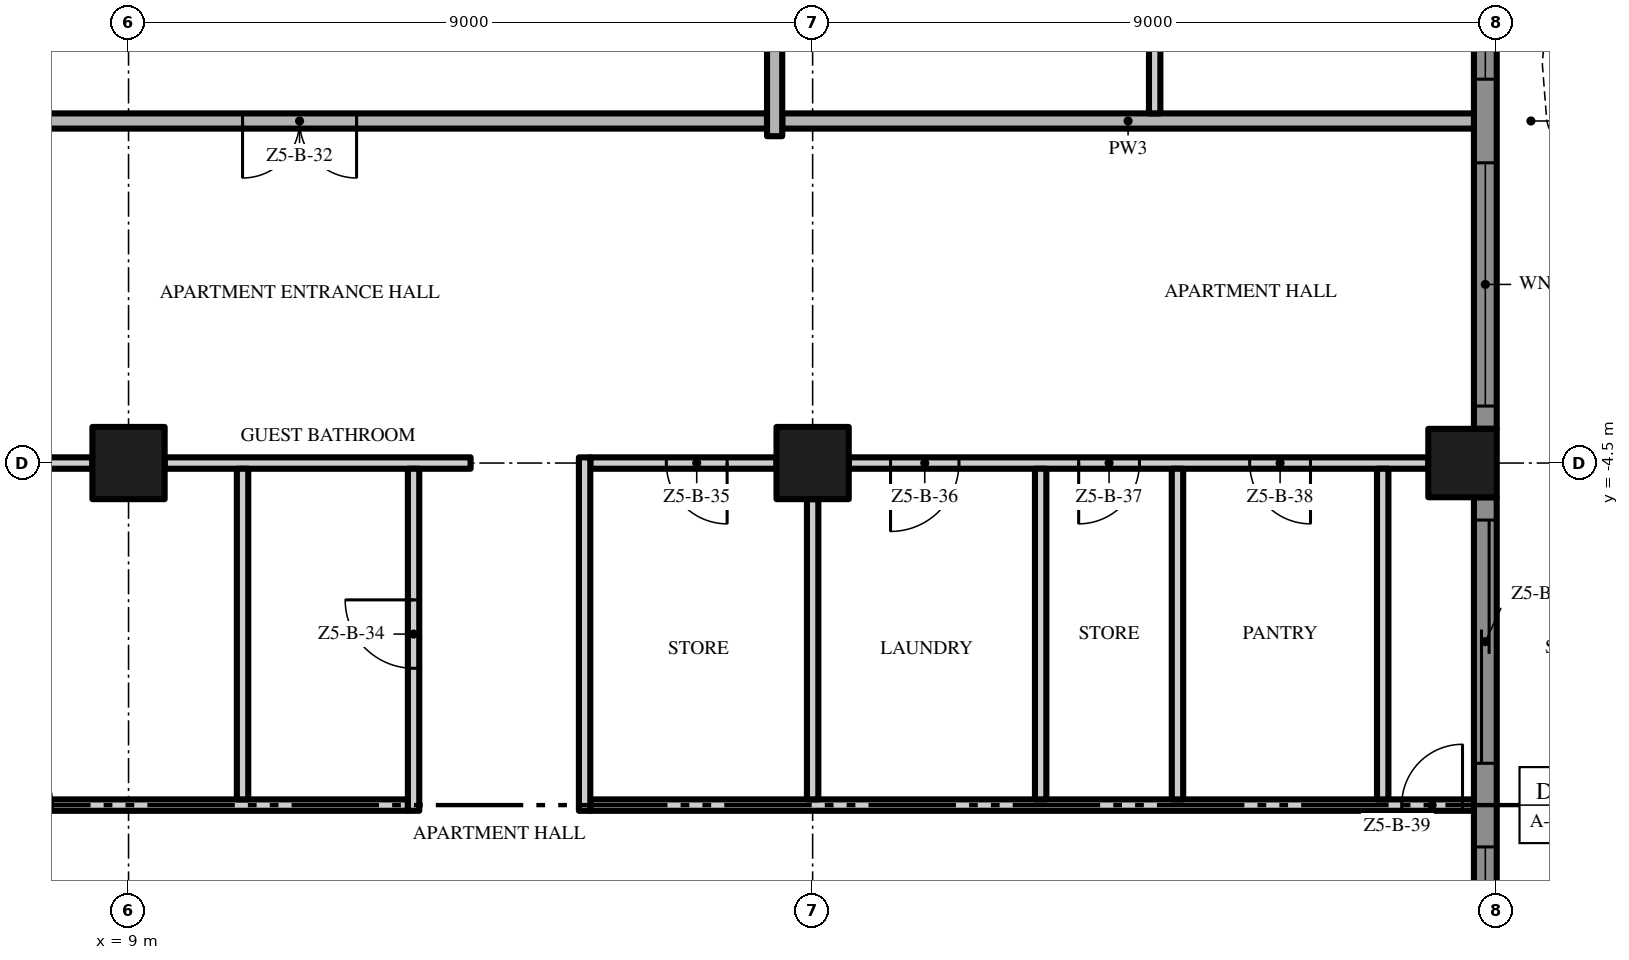
"""IFC4 building model, lengths in metres.
Left out: names, types, materials, properties, quantities, classifications, styles, units other than length and angle.
Written with IfcOpenShell. Run it as: python <this file> out.ifc"""

import sys

from ifc_helpers import new_model, si_unit, direction, frame, frame_2d, origin, origin_2d, place, context, subcontext, project, spatial, polyline, rectangle, outline, extrude, element, fill, save


model = new_model("IFC4")
c1 = context("Model", 3, precision=1e-05, world=origin(), true_north=direction((0.0, 1.0)))
c2 = subcontext(c1, "Body", "Model", "MODEL_VIEW")
j1 = project(units=[si_unit("LENGTHUNIT", "METRE"), si_unit("PLANEANGLEUNIT", "RADIAN")], contexts=[c1])
p1 = place(None, origin())
s1 = spatial("IfcSite", under=j1, at=p1, CompositionType="ELEMENT")
p2 = place(p1, origin())
s2 = spatial("IfcBuilding", under=s1, at=p2, CompositionType="ELEMENT")
p3 = place(p2, frame((0.0, 0.0, 257.8)))
s3 = spatial("IfcBuildingStorey", under=s2, at=p3, CompositionType="ELEMENT", Elevation=257.8)
p4 = place(p3, frame((18.0, -4.5, 0.0), z_axis=(0.0, 0.0, 1.0), x_axis=(1.0, 0.0, 0.0)))
e1 = element("IfcColumn", 1, at=p4, inside=s3, PredefinedType="COLUMN", context=c2, shape_type="SweptSolid", body=[
    extrude(rectangle(XDim=0.95, YDim=0.95, at=origin_2d()), origin(), (0.0, 0.0, 1.0), 3.5),
])
p5 = place(p3, frame((26.55, -4.5, 0.0), z_axis=(0.0, 0.0, 1.0), x_axis=(1.0, 0.0, 0.0)))
e2 = element("IfcColumn", 2, at=p5, inside=s3, PredefinedType="COLUMN", context=c2, shape_type="SweptSolid", body=[
    extrude(rectangle(XDim=0.9, YDim=0.9, at=origin_2d()), origin(), (0.0, 0.0, 1.0), 3.5),
])
p6 = place(p3, frame((9.0, -4.5, 0.0), z_axis=(0.0, 0.0, 1.0), x_axis=(1.0, 0.0, 0.0)))
e3 = element("IfcColumn", 3, at=p6, inside=s3, PredefinedType="COLUMN", context=c2, shape_type="SweptSolid", body=[
    extrude(rectangle(XDim=0.95, YDim=0.95, at=origin_2d()), origin(), (0.0, 0.0, 1.0), 3.5),
])
p7 = place(p3, frame((26.85, -4.95, 0.0), z_axis=(0.0, 0.0, 1.0), x_axis=(0.0, -1.0, 0.0)))
e4 = element("IfcWall", 4, at=p7, inside=s3, PredefinedType="SOLIDWALL", context=c2, shape_type="SweptSolid", body=[
    extrude(rectangle(XDim=8.1, YDim=0.3, at=frame_2d((4.05, 0.0))), origin(), (0.0, 0.0, 1.0), 3.5),
])
p8 = place(p7, frame((4.6, 0.0, 0.45)))
e5 = element("IfcOpeningElement", 5, at=p8, cuts=e4, PredefinedType="OPENING", context=c2, shape_type="SweptSolid", body=[
    extrude(rectangle(XDim=3.2, YDim=2.65, at=frame_2d((1.6, 1.325))), frame((0.0, 0.16, 0.0), z_axis=(0.0, -1.0, 0.0), x_axis=(1.0, 0.0, 0.0)), (0.0, 0.0, 1.0), 0.32),
])
p9 = place(p7, frame((0.3, 0.0, 0.0)))
e6 = element("IfcOpeningElement", 6, at=p9, cuts=e4, PredefinedType="OPENING", context=c2, shape_type="SweptSolid", body=[
    extrude(rectangle(XDim=3.2, YDim=2.4, at=frame_2d((1.6, 1.2))), frame((0.0, 0.16, 0.0), z_axis=(0.0, -1.0, 0.0), x_axis=(1.0, 0.0, 0.0)), (0.0, 0.0, 1.0), 0.32),
])
p10 = place(p3, frame((26.85, 4.05, 0.0), z_axis=(0.0, 0.0, 1.0), x_axis=(0.0, -1.0, 0.0)))
e7 = element("IfcWall", 7, at=p10, inside=s3, PredefinedType="SOLIDWALL", context=c2, shape_type="SweptSolid", body=[
    extrude(rectangle(XDim=8.1, YDim=0.3, at=frame_2d((4.05, 0.0))), origin(), (0.0, 0.0, 1.0), 3.5),
])
p11 = place(p10, frame((4.6, 0.0, 0.45)))
e8 = element("IfcOpeningElement", 8, at=p11, cuts=e7, PredefinedType="OPENING", context=c2, shape_type="SweptSolid", body=[
    extrude(rectangle(XDim=3.2, YDim=2.65, at=frame_2d((1.6, 1.325))), frame((0.0, 0.16, 0.0), z_axis=(0.0, -1.0, 0.0), x_axis=(1.0, 0.0, 0.0)), (0.0, 0.0, 1.0), 0.32),
])
p12 = place(p10, frame((0.3, 0.0, 0.45)))
e9 = element("IfcOpeningElement", 9, at=p12, cuts=e7, PredefinedType="OPENING", context=c2, shape_type="SweptSolid", body=[
    extrude(rectangle(XDim=3.2, YDim=2.65, at=frame_2d((1.6, 1.325))), frame((0.0, 0.16, 0.0), z_axis=(0.0, -1.0, 0.0), x_axis=(1.0, 0.0, 0.0)), (0.0, 0.0, 1.0), 0.32),
])
p13 = place(p3, origin())
e10 = element("IfcWall", 10, at=p13, inside=s3, PredefinedType="USERDEFINED", context=c2, shape_type="SweptSolid", body=[
    extrude(outline(polyline([(28.8, -18.0), (28.095, -16.5), (27.659, -15.0), (27.6, -14.25), (27.659, -13.5), (28.095, -12.0), (28.8, -10.5), (29.505, -9.0), (29.941, -7.5), (30.0, -6.75), (29.941, -6.0), (29.505, -4.5), (28.8, -3.0), (28.095, -1.5), (27.659, 0.0), (27.6, 0.75), (27.659, 1.5), (28.095, 3.0), (28.8, 4.5), (29.505, 6.0), (29.941, 7.5), (30.0, 8.25), (29.941, 9.0), (29.505, 10.5), (28.8, 12.0), (28.095, 13.5), (27.659, 15.0), (27.6, 15.75), (27.659, 16.5), (28.095, 18.0), (27.855, 18.07), (27.411, 16.545), (27.349, 15.75), (27.411, 14.955), (27.86, 13.411), (28.574, 11.894), (29.271, 10.411), (29.694, 8.955), (29.749, 8.25), (29.694, 7.545), (29.271, 6.089), (28.574, 4.606), (27.86, 3.089), (27.411, 1.545), (27.349, 0.75), (27.411, -0.045), (27.86, -1.589), (28.574, -3.106), (29.271, -4.589), (29.694, -6.045), (29.749, -6.75), (29.694, -7.455), (29.271, -8.911), (28.574, -10.394), (27.86, -11.911), (27.411, -13.455), (27.349, -14.25), (27.411, -15.045), (27.86, -16.589), (28.574, -18.106), (28.8, -18.0)])), origin(), (0.0, 0.0, 1.0), 0.9),
])
p14 = place(p3, frame((4.6, -9.0, 0.0), z_axis=(0.0, 0.0, 1.0), x_axis=(1.0, 0.0, 0.0)))
e11 = element("IfcWall", 11, at=p14, inside=s3, PredefinedType="PARTITIONING", context=c2, shape_type="SweptSolid", body=[
    extrude(rectangle(XDim=8.075, YDim=0.15, at=frame_2d((4.037, 0.0))), origin(), (0.0, 0.0, 1.0), 3.5),
])
p15 = place(p14, frame((2.4, 0.0, 0.0)))
e12 = element("IfcOpeningElement", 12, at=p15, cuts=e11, PredefinedType="OPENING", context=c2, shape_type="SweptSolid", body=[
    extrude(rectangle(XDim=1.0, YDim=2.4, at=frame_2d((0.5, 1.2))), frame((0.0, 0.085, 0.0), z_axis=(0.0, -1.0, 0.0), x_axis=(1.0, 0.0, 0.0)), (0.0, 0.0, 1.0), 0.17),
])
p16 = place(p3, frame((15.075, -9.0, 0.0), z_axis=(0.0, 0.0, 1.0), x_axis=(1.0, 0.0, 0.0)))
e13 = element("IfcWall", 13, at=p16, inside=s3, PredefinedType="PARTITIONING", context=c2, shape_type="SweptSolid", body=[
    extrude(rectangle(XDim=11.625, YDim=0.15, at=frame_2d((5.812, 0.0))), origin(), (0.0, 0.0, 1.0), 3.5),
])
p17 = place(p16, frame((10.675, 0.0, 0.0)))
e14 = element("IfcOpeningElement", 14, at=p17, cuts=e13, PredefinedType="OPENING", context=c2, shape_type="SweptSolid", body=[
    extrude(rectangle(XDim=0.8, YDim=2.0, at=frame_2d((0.4, 1.0))), frame((0.0, 0.085, 0.0), z_axis=(0.0, -1.0, 0.0), x_axis=(1.0, 0.0, 0.0)), (0.0, 0.0, 1.0), 0.17),
])
p18 = place(p3, frame((4.6, -4.5, 0.0), z_axis=(0.0, 0.0, 1.0), x_axis=(1.0, 0.0, 0.0)))
e15 = element("IfcWall", 15, at=p18, inside=s3, PredefinedType="PARTITIONING", context=c2, shape_type="SweptSolid", body=[
    extrude(rectangle(XDim=3.925, YDim=0.15, at=frame_2d((1.962, 0.0))), origin(), (0.0, 0.0, 1.0), 3.5),
])
p19 = place(p3, frame((9.475, -4.5, 0.0), z_axis=(0.0, 0.0, 1.0), x_axis=(1.0, 0.0, 0.0)))
e16 = element("IfcWall", 16, at=p19, inside=s3, PredefinedType="PARTITIONING", context=c2, shape_type="SweptSolid", body=[
    extrude(rectangle(XDim=4.025, YDim=0.15, at=frame_2d((2.013, 0.0))), origin(), (0.0, 0.0, 1.0), 3.5),
])
p20 = place(p3, frame((17.525, -4.5, 0.0), z_axis=(0.0, 0.0, 1.0), x_axis=(-1.0, 0.0, 0.0)))
e17 = element("IfcWall", 17, at=p20, inside=s3, PredefinedType="PARTITIONING", context=c2, shape_type="SweptSolid", body=[
    extrude(rectangle(XDim=2.45, YDim=0.15, at=frame_2d((1.225, 0.0))), origin(), (0.0, 0.0, 1.0), 3.5),
])
p21 = place(p20, frame((0.65, 0.0, 0.0)))
e18 = element("IfcOpeningElement", 18, at=p21, cuts=e17, PredefinedType="OPENING", context=c2, shape_type="SweptSolid", body=[
    extrude(rectangle(XDim=0.8, YDim=2.0, at=frame_2d((0.4, 1.0))), frame((0.0, 0.085, 0.0), z_axis=(0.0, -1.0, 0.0), x_axis=(1.0, 0.0, 0.0)), (0.0, 0.0, 1.0), 0.17),
])
p22 = place(p3, frame((26.1, -4.5, 0.0), z_axis=(0.0, 0.0, 1.0), x_axis=(-1.0, 0.0, 0.0)))
e19 = element("IfcWall", 19, at=p22, inside=s3, PredefinedType="PARTITIONING", context=c2, shape_type="SweptSolid", body=[
    extrude(rectangle(XDim=7.625, YDim=0.15, at=frame_2d((3.812, 0.0))), origin(), (0.0, 0.0, 1.0), 3.5),
])
p23 = place(p22, frame((6.175, 0.0, 0.0)))
e20 = element("IfcOpeningElement", 20, at=p23, cuts=e19, PredefinedType="OPENING", context=c2, shape_type="SweptSolid", body=[
    extrude(rectangle(XDim=0.9, YDim=2.1, at=frame_2d((0.45, 1.05))), frame((0.0, 0.085, 0.0), z_axis=(0.0, -1.0, 0.0), x_axis=(1.0, 0.0, 0.0)), (0.0, 0.0, 1.0), 0.17),
])
p24 = place(p22, frame((3.8, 0.0, 0.0)))
e21 = element("IfcOpeningElement", 21, at=p24, cuts=e19, PredefinedType="OPENING", context=c2, shape_type="SweptSolid", body=[
    extrude(rectangle(XDim=0.8, YDim=2.0, at=frame_2d((0.4, 1.0))), frame((0.0, 0.085, 0.0), z_axis=(0.0, -1.0, 0.0), x_axis=(1.0, 0.0, 0.0)), (0.0, 0.0, 1.0), 0.17),
])
p25 = place(p22, frame((1.55, 0.0, 0.0)))
e22 = element("IfcOpeningElement", 22, at=p25, cuts=e19, PredefinedType="OPENING", context=c2, shape_type="SweptSolid", body=[
    extrude(rectangle(XDim=0.8, YDim=2.0, at=frame_2d((0.4, 1.0))), frame((0.0, 0.085, 0.0), z_axis=(0.0, -1.0, 0.0), x_axis=(1.0, 0.0, 0.0)), (0.0, 0.0, 1.0), 0.17),
])
p26 = place(p3, frame((17.4, 0.0, 0.0), z_axis=(0.0, 0.0, 1.0), x_axis=(-1.0, 0.0, 0.0)))
e23 = element("IfcWall", 23, at=p26, inside=s3, PredefinedType="PARTITIONING", context=c2, shape_type="SweptSolid", body=[
    extrude(rectangle(XDim=34.8, YDim=0.2, at=frame_2d((17.4, 0.0))), origin(), (0.0, 0.0, 1.0), 3.5),
])
p27 = place(p26, frame((23.4, 0.0, 0.0)))
e24 = element("IfcOpeningElement", 24, at=p27, cuts=e23, PredefinedType="OPENING", context=c2, shape_type="SweptSolid", body=[
    extrude(rectangle(XDim=1.5, YDim=2.4, at=frame_2d((0.75, 1.2))), frame((0.0, 0.11, 0.0), z_axis=(0.0, -1.0, 0.0), x_axis=(1.0, 0.0, 0.0)), (0.0, 0.0, 1.0), 0.22),
])
p28 = place(p26, frame((5.4, 0.0, 0.0)))
e25 = element("IfcOpeningElement", 25, at=p28, cuts=e23, PredefinedType="OPENING", context=c2, shape_type="SweptSolid", body=[
    extrude(rectangle(XDim=1.5, YDim=2.4, at=frame_2d((0.75, 1.2))), frame((0.0, 0.11, 0.0), z_axis=(0.0, -1.0, 0.0), x_axis=(1.0, 0.0, 0.0)), (0.0, 0.0, 1.0), 0.22),
])
p29 = place(p3, frame((17.6, 0.0, 0.0), z_axis=(0.0, 0.0, 1.0), x_axis=(1.0, 0.0, 0.0)))
e26 = element("IfcWall", 26, at=p29, inside=s3, PredefinedType="PARTITIONING", context=c2, shape_type="SweptSolid", body=[
    extrude(rectangle(XDim=9.1, YDim=0.2, at=frame_2d((4.55, 0.0))), origin(), (0.0, 0.0, 1.0), 3.5),
])
p30 = place(p3, frame((10.5, -8.925, 0.0), z_axis=(0.0, 0.0, 1.0), x_axis=(0.0, 1.0, 0.0)))
e27 = element("IfcWall", 27, at=p30, inside=s3, PredefinedType="PARTITIONING", context=c2, shape_type="SweptSolid", body=[
    extrude(rectangle(XDim=4.35, YDim=0.15, at=frame_2d((2.175, 0.0))), origin(), (0.0, 0.0, 1.0), 3.5),
])
p31 = place(p3, frame((12.75, -9.075, 0.0), z_axis=(0.0, 0.0, 1.0), x_axis=(0.0, 1.0, 0.0)))
e28 = element("IfcWall", 28, at=p31, inside=s3, PredefinedType="PARTITIONING", context=c2, shape_type="SweptSolid", body=[
    extrude(rectangle(XDim=4.5, YDim=0.15, at=frame_2d((2.25, 0.0))), origin(), (0.0, 0.0, 1.0), 3.5),
])
p32 = place(p31, frame((1.875, 0.0, 0.0)))
e29 = element("IfcOpeningElement", 29, at=p32, cuts=e28, PredefinedType="OPENING", context=c2, shape_type="SweptSolid", body=[
    extrude(rectangle(XDim=0.9, YDim=2.1, at=frame_2d((0.45, 1.05))), frame((0.0, 0.085, 0.0), z_axis=(0.0, -1.0, 0.0), x_axis=(1.0, 0.0, 0.0)), (0.0, 0.0, 1.0), 0.17),
])
p33 = place(p3, frame((15.0, -9.075, 0.0), z_axis=(0.0, 0.0, 1.0), x_axis=(0.0, 1.0, 0.0)))
e30 = element("IfcWall", 30, at=p33, inside=s3, PredefinedType="PARTITIONING", context=c2, shape_type="SweptSolid", body=[
    extrude(rectangle(XDim=4.65, YDim=0.15, at=frame_2d((2.325, 0.0))), origin(), (0.0, 0.0, 1.0), 3.5),
])
p34 = place(p3, frame((17.5, -0.2, 0.0), z_axis=(0.0, 0.0, 1.0), x_axis=(0.0, 1.0, 0.0)))
e31 = element("IfcWall", 31, at=p34, inside=s3, PredefinedType="PARTITIONING", context=c2, shape_type="SweptSolid", body=[
    extrude(rectangle(XDim=4.225, YDim=0.2, at=frame_2d((2.112, 0.0))), origin(), (0.0, 0.0, 1.0), 3.5),
])
p35 = place(p3, frame((18.0, -8.925, 0.0), z_axis=(0.0, 0.0, 1.0), x_axis=(0.0, 1.0, 0.0)))
e32 = element("IfcWall", 32, at=p35, inside=s3, PredefinedType="PARTITIONING", context=c2, shape_type="SweptSolid", body=[
    extrude(rectangle(XDim=3.95, YDim=0.15, at=frame_2d((1.975, 0.0))), origin(), (0.0, 0.0, 1.0), 3.5),
])
p36 = place(p3, frame((21.0, -8.925, 0.0), z_axis=(0.0, 0.0, 1.0), x_axis=(0.0, 1.0, 0.0)))
e33 = element("IfcWall", 33, at=p36, inside=s3, PredefinedType="PARTITIONING", context=c2, shape_type="SweptSolid", body=[
    extrude(rectangle(XDim=4.35, YDim=0.15, at=frame_2d((2.175, 0.0))), origin(), (0.0, 0.0, 1.0), 3.5),
])
p37 = place(p3, frame((22.5, 17.55, 0.0), z_axis=(0.0, 0.0, 1.0), x_axis=(0.0, -1.0, 0.0)))
e34 = element("IfcWall", 34, at=p37, inside=s3, PredefinedType="PARTITIONING", context=c2, shape_type="SweptSolid", body=[
    extrude(rectangle(XDim=17.45, YDim=0.15, at=frame_2d((8.725, 0.0))), origin(), (0.0, 0.0, 1.0), 3.5),
])
p38 = place(p37, frame((14.8, 0.0, 0.0)))
e35 = element("IfcOpeningElement", 35, at=p38, cuts=e34, PredefinedType="OPENING", context=c2, shape_type="SweptSolid", body=[
    extrude(rectangle(XDim=1.0, YDim=2.4, at=frame_2d((0.5, 1.2))), frame((0.0, 0.085, 0.0), z_axis=(0.0, -1.0, 0.0), x_axis=(1.0, 0.0, 0.0)), (0.0, 0.0, 1.0), 0.17),
])
p39 = place(p37, frame((7.65, 0.0, 0.0)))
e36 = element("IfcOpeningElement", 36, at=p39, cuts=e34, PredefinedType="OPENING", context=c2, shape_type="SweptSolid", body=[
    extrude(rectangle(XDim=1.8, YDim=2.4, at=frame_2d((0.9, 1.2))), frame((0.0, 0.085, 0.0), z_axis=(0.0, -1.0, 0.0), x_axis=(1.0, 0.0, 0.0)), (0.0, 0.0, 1.0), 0.17),
])
for number, where, z_axis, x_axis in (
    (37, (22.8, -8.925, 0.0), (0.0, 0.0, 1.0), (0.0, 1.0, 0.0)),
    (38, (25.5, -8.925, 0.0), (0.0, 0.0, 1.0), (0.0, 1.0, 0.0)),
):
    element("IfcWall", number, at=place(p3, frame(where, z_axis=z_axis, x_axis=x_axis)), inside=s3, PredefinedType="PARTITIONING", context=c2, shape_type="SweptSolid", body=[
        extrude(rectangle(XDim=4.35, YDim=0.15, at=frame_2d((2.175, 0.0))), origin(), (0.0, 0.0, 1.0), 3.5),
    ])
p40 = place(p8, origin())
e39 = element("IfcWindow", 39, at=p40, inside=s3, PartitioningType="SINGLE_PANEL", PredefinedType="WINDOW", context=c2, shape_type="SweptSolid", body=[
    extrude(rectangle(XDim=3.2, YDim=2.65, at=frame_2d((1.6, 1.325))), frame((0.0, 0.03, 0.0), z_axis=(0.0, -1.0, 0.0), x_axis=(1.0, 0.0, 0.0)), (0.0, 0.0, 1.0), 0.06),
])
fill(e5, e39)
p41 = place(p9, origin())
e40 = element("IfcDoor", 40, at=p41, inside=s3, OperationType="SINGLE_SWING_LEFT", PredefinedType="DOOR", context=c2, shape_type="SweptSolid", body=[
    extrude(rectangle(XDim=3.2, YDim=2.4, at=frame_2d((1.6, 1.2))), frame((0.0, 0.025, 0.0), z_axis=(0.0, -1.0, 0.0), x_axis=(1.0, 0.0, 0.0)), (0.0, 0.0, 1.0), 0.05),
])
fill(e6, e40)
p42 = place(p11, origin())
e41 = element("IfcWindow", 41, at=p42, inside=s3, PartitioningType="SINGLE_PANEL", PredefinedType="WINDOW", context=c2, shape_type="SweptSolid", body=[
    extrude(rectangle(XDim=3.2, YDim=2.65, at=frame_2d((1.6, 1.325))), frame((0.0, 0.03, 0.0), z_axis=(0.0, -1.0, 0.0), x_axis=(1.0, 0.0, 0.0)), (0.0, 0.0, 1.0), 0.06),
])
fill(e8, e41)
p43 = place(p12, origin())
e42 = element("IfcWindow", 42, at=p43, inside=s3, PartitioningType="SINGLE_PANEL", PredefinedType="WINDOW", context=c2, shape_type="SweptSolid", body=[
    extrude(rectangle(XDim=3.2, YDim=2.65, at=frame_2d((1.6, 1.325))), frame((0.0, 0.03, 0.0), z_axis=(0.0, -1.0, 0.0), x_axis=(1.0, 0.0, 0.0)), (0.0, 0.0, 1.0), 0.06),
])
fill(e9, e42)
p44 = place(p28, origin())
e43 = element("IfcDoor", 43, at=p44, inside=s3, OperationType="DOUBLE_DOOR_SINGLE_SWING", PredefinedType="DOOR", context=c2, shape_type="SweptSolid", body=[
    extrude(rectangle(XDim=1.5, YDim=2.4, at=frame_2d((0.75, 1.2))), frame((0.0, 0.025, 0.0), z_axis=(0.0, -1.0, 0.0), x_axis=(1.0, 0.0, 0.0)), (0.0, 0.0, 1.0), 0.05),
])
fill(e25, e43)
p45 = place(p32, origin())
e44 = element("IfcDoor", 44, at=p45, inside=s3, OperationType="SINGLE_SWING_RIGHT", PredefinedType="DOOR", context=c2, shape_type="SweptSolid", body=[
    extrude(rectangle(XDim=0.9, YDim=2.1, at=frame_2d((0.45, 1.05))), frame((0.0, 0.025, 0.0), z_axis=(0.0, -1.0, 0.0), x_axis=(1.0, 0.0, 0.0)), (0.0, 0.0, 1.0), 0.05),
])
fill(e29, e44)
p46 = place(p21, origin())
e45 = element("IfcDoor", 45, at=p46, inside=s3, OperationType="SINGLE_SWING_LEFT", PredefinedType="DOOR", context=c2, shape_type="SweptSolid", body=[
    extrude(rectangle(XDim=0.8, YDim=2.0, at=frame_2d((0.4, 1.0))), frame((0.0, 0.025, 0.0), z_axis=(0.0, -1.0, 0.0), x_axis=(1.0, 0.0, 0.0)), (0.0, 0.0, 1.0), 0.05),
])
fill(e18, e45)
p47 = place(p23, origin())
e46 = element("IfcDoor", 46, at=p47, inside=s3, OperationType="SINGLE_SWING_RIGHT", PredefinedType="DOOR", context=c2, shape_type="SweptSolid", body=[
    extrude(rectangle(XDim=0.9, YDim=2.1, at=frame_2d((0.45, 1.05))), frame((0.0, 0.025, 0.0), z_axis=(0.0, -1.0, 0.0), x_axis=(1.0, 0.0, 0.0)), (0.0, 0.0, 1.0), 0.05),
])
fill(e20, e46)
p48 = place(p24, origin())
e47 = element("IfcDoor", 47, at=p48, inside=s3, OperationType="SINGLE_SWING_RIGHT", PredefinedType="DOOR", context=c2, shape_type="SweptSolid", body=[
    extrude(rectangle(XDim=0.8, YDim=2.0, at=frame_2d((0.4, 1.0))), frame((0.0, 0.025, 0.0), z_axis=(0.0, -1.0, 0.0), x_axis=(1.0, 0.0, 0.0)), (0.0, 0.0, 1.0), 0.05),
])
fill(e21, e47)
p49 = place(p25, origin())
e48 = element("IfcDoor", 48, at=p49, inside=s3, OperationType="SINGLE_SWING_LEFT", PredefinedType="DOOR", context=c2, shape_type="SweptSolid", body=[
    extrude(rectangle(XDim=0.8, YDim=2.0, at=frame_2d((0.4, 1.0))), frame((0.0, 0.025, 0.0), z_axis=(0.0, -1.0, 0.0), x_axis=(1.0, 0.0, 0.0)), (0.0, 0.0, 1.0), 0.05),
])
fill(e22, e48)
p50 = place(p17, origin())
e49 = element("IfcDoor", 49, at=p50, inside=s3, OperationType="SINGLE_SWING_RIGHT", PredefinedType="DOOR", context=c2, shape_type="SweptSolid", body=[
    extrude(rectangle(XDim=0.8, YDim=2.0, at=frame_2d((0.4, 1.0))), frame((0.0, 0.025, 0.0), z_axis=(0.0, -1.0, 0.0), x_axis=(1.0, 0.0, 0.0)), (0.0, 0.0, 1.0), 0.05),
])
fill(e14, e49)
save(model, sys.argv[1])
